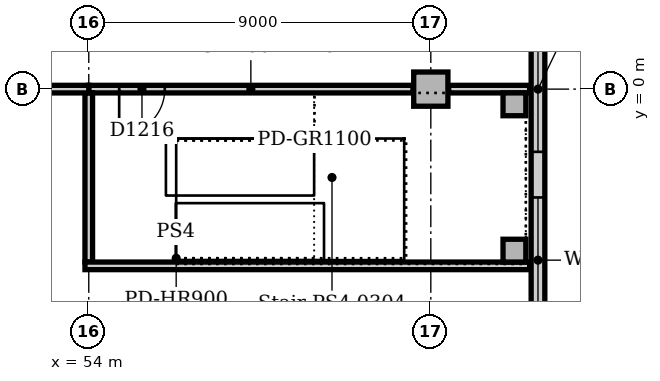
"""IFC4 building model, lengths in metres.
Left out: names, types, materials, properties, quantities, classifications, styles, units other than length and angle.
Written with IfcOpenShell. Run it as: python <this file> out.ifc"""

import sys

from ifc_helpers import new_model, si_unit, direction, frame, frame_2d, origin, origin_2d, place, context, subcontext, project, spatial, rectangle, extrude, element, fill, save


model = new_model("IFC4")
c1 = context("Model", 3, precision=1e-05, world=origin(), true_north=direction((0.0, 1.0)))
c2 = subcontext(c1, "Body", "Model", "MODEL_VIEW")
j1 = project(units=[si_unit("LENGTHUNIT", "METRE"), si_unit("PLANEANGLEUNIT", "RADIAN")], contexts=[c1])
p1 = place(None, origin())
s1 = spatial("IfcSite", under=j1, at=p1, CompositionType="ELEMENT")
p2 = place(p1, origin())
s2 = spatial("IfcBuilding", under=s1, at=p2, CompositionType="ELEMENT")
p3 = place(p2, frame((0.0, 0.0, 16.0)))
s3 = spatial("IfcBuildingStorey", under=s2, at=p3, CompositionType="ELEMENT", Elevation=16.0)
p4 = place(p3, frame((63.0, 0.0, 0.0), z_axis=(0.0, 0.0, 1.0), x_axis=(1.0, 0.0, 0.0)))
e1 = element("IfcColumn", 1, at=p4, inside=s3, PredefinedType="COLUMN", context=c2, shape_type="SweptSolid", body=[
    extrude(rectangle(XDim=0.9, YDim=0.9, at=origin_2d()), origin(), (0.0, 0.0, 1.0), 4.7),
])
p5 = place(p3, frame((65.82, -9.0, 0.0), z_axis=(0.0, 0.0, 1.0), x_axis=(0.0, 1.0, 0.0)))
e2 = element("IfcWall", 2, at=p5, inside=s3, PredefinedType="STANDARD", context=c2, shape_type="SweptSolid", body=[
    extrude(rectangle(XDim=63.0, YDim=0.36, at=frame_2d((31.5, 0.0))), origin(), (0.0, 0.0, 1.0), 4.7),
])
p6 = place(p5, frame((2.85, 0.0, 0.9)))
e3 = element("IfcOpeningElement", 3, at=p6, cuts=e2, PredefinedType="OPENING", context=c2, shape_type="SweptSolid", body=[
    extrude(rectangle(XDim=3.3, YDim=2.4, at=frame_2d((1.65, 1.2))), frame((0.0, 0.19, 0.0), z_axis=(0.0, -1.0, 0.0), x_axis=(1.0, 0.0, 0.0)), (0.0, 0.0, 1.0), 0.38),
])
p7 = place(p5, frame((7.35, 0.0, 0.9)))
e4 = element("IfcOpeningElement", 4, at=p7, cuts=e2, PredefinedType="OPENING", context=c2, shape_type="SweptSolid", body=[
    extrude(rectangle(XDim=3.3, YDim=2.4, at=frame_2d((1.65, 1.2))), frame((0.0, 0.19, 0.0), z_axis=(0.0, -1.0, 0.0), x_axis=(1.0, 0.0, 0.0)), (0.0, 0.0, 1.0), 0.38),
])
p8 = place(p5, frame((11.85, 0.0, 0.9)))
e5 = element("IfcOpeningElement", 5, at=p8, cuts=e2, PredefinedType="OPENING", context=c2, shape_type="SweptSolid", body=[
    extrude(rectangle(XDim=3.3, YDim=2.4, at=frame_2d((1.65, 1.2))), frame((0.0, 0.19, 0.0), z_axis=(0.0, -1.0, 0.0), x_axis=(1.0, 0.0, 0.0)), (0.0, 0.0, 1.0), 0.38),
])
p9 = place(p5, frame((16.35, 0.0, 0.9)))
e6 = element("IfcOpeningElement", 6, at=p9, cuts=e2, PredefinedType="OPENING", context=c2, shape_type="SweptSolid", body=[
    extrude(rectangle(XDim=3.3, YDim=2.4, at=frame_2d((1.65, 1.2))), frame((0.0, 0.19, 0.0), z_axis=(0.0, -1.0, 0.0), x_axis=(1.0, 0.0, 0.0)), (0.0, 0.0, 1.0), 0.38),
])
p10 = place(p5, frame((20.85, 0.0, 0.9)))
e7 = element("IfcOpeningElement", 7, at=p10, cuts=e2, PredefinedType="OPENING", context=c2, shape_type="SweptSolid", body=[
    extrude(rectangle(XDim=3.3, YDim=2.4, at=frame_2d((1.65, 1.2))), frame((0.0, 0.19, 0.0), z_axis=(0.0, -1.0, 0.0), x_axis=(1.0, 0.0, 0.0)), (0.0, 0.0, 1.0), 0.38),
])
p11 = place(p5, frame((25.35, 0.0, 0.9)))
e8 = element("IfcOpeningElement", 8, at=p11, cuts=e2, PredefinedType="OPENING", context=c2, shape_type="SweptSolid", body=[
    extrude(rectangle(XDim=3.3, YDim=2.4, at=frame_2d((1.65, 1.2))), frame((0.0, 0.19, 0.0), z_axis=(0.0, -1.0, 0.0), x_axis=(1.0, 0.0, 0.0)), (0.0, 0.0, 1.0), 0.38),
])
p12 = place(p5, frame((29.85, 0.0, 0.9)))
e9 = element("IfcOpeningElement", 9, at=p12, cuts=e2, PredefinedType="OPENING", context=c2, shape_type="SweptSolid", body=[
    extrude(rectangle(XDim=3.3, YDim=2.4, at=frame_2d((1.65, 1.2))), frame((0.0, 0.19, 0.0), z_axis=(0.0, -1.0, 0.0), x_axis=(1.0, 0.0, 0.0)), (0.0, 0.0, 1.0), 0.38),
])
p13 = place(p5, frame((34.35, 0.0, 0.9)))
e10 = element("IfcOpeningElement", 10, at=p13, cuts=e2, PredefinedType="OPENING", context=c2, shape_type="SweptSolid", body=[
    extrude(rectangle(XDim=3.3, YDim=2.4, at=frame_2d((1.65, 1.2))), frame((0.0, 0.19, 0.0), z_axis=(0.0, -1.0, 0.0), x_axis=(1.0, 0.0, 0.0)), (0.0, 0.0, 1.0), 0.38),
])
p14 = place(p5, frame((38.85, 0.0, 0.9)))
e11 = element("IfcOpeningElement", 11, at=p14, cuts=e2, PredefinedType="OPENING", context=c2, shape_type="SweptSolid", body=[
    extrude(rectangle(XDim=3.3, YDim=2.4, at=frame_2d((1.65, 1.2))), frame((0.0, 0.19, 0.0), z_axis=(0.0, -1.0, 0.0), x_axis=(1.0, 0.0, 0.0)), (0.0, 0.0, 1.0), 0.38),
])
p15 = place(p5, frame((43.35, 0.0, 0.9)))
e12 = element("IfcOpeningElement", 12, at=p15, cuts=e2, PredefinedType="OPENING", context=c2, shape_type="SweptSolid", body=[
    extrude(rectangle(XDim=3.3, YDim=2.4, at=frame_2d((1.65, 1.2))), frame((0.0, 0.19, 0.0), z_axis=(0.0, -1.0, 0.0), x_axis=(1.0, 0.0, 0.0)), (0.0, 0.0, 1.0), 0.38),
])
p16 = place(p5, frame((47.85, 0.0, 0.9)))
e13 = element("IfcOpeningElement", 13, at=p16, cuts=e2, PredefinedType="OPENING", context=c2, shape_type="SweptSolid", body=[
    extrude(rectangle(XDim=3.3, YDim=2.4, at=frame_2d((1.65, 1.2))), frame((0.0, 0.19, 0.0), z_axis=(0.0, -1.0, 0.0), x_axis=(1.0, 0.0, 0.0)), (0.0, 0.0, 1.0), 0.38),
])
p17 = place(p5, frame((52.35, 0.0, 0.9)))
e14 = element("IfcOpeningElement", 14, at=p17, cuts=e2, PredefinedType="OPENING", context=c2, shape_type="SweptSolid", body=[
    extrude(rectangle(XDim=3.3, YDim=2.4, at=frame_2d((1.65, 1.2))), frame((0.0, 0.19, 0.0), z_axis=(0.0, -1.0, 0.0), x_axis=(1.0, 0.0, 0.0)), (0.0, 0.0, 1.0), 0.38),
])
p18 = place(p5, frame((56.85, 0.0, 0.9)))
e15 = element("IfcOpeningElement", 15, at=p18, cuts=e2, PredefinedType="OPENING", context=c2, shape_type="SweptSolid", body=[
    extrude(rectangle(XDim=3.3, YDim=2.4, at=frame_2d((1.65, 1.2))), frame((0.0, 0.19, 0.0), z_axis=(0.0, -1.0, 0.0), x_axis=(1.0, 0.0, 0.0)), (0.0, 0.0, 1.0), 0.38),
])
for number, where, z_axis, x_axis in (
    (16, (65.2, -4.25, 0.0), (0.0, 0.0, 1.0), (1.0, 0.0, 0.0)),
    (17, (65.2, -0.4, 0.0), (0.0, 0.0, 1.0), (1.0, 0.0, 0.0)),
):
    element("IfcColumn", number, at=place(p3, frame(where, z_axis=z_axis, x_axis=x_axis)), inside=s3, PredefinedType="COLUMN", context=c2, shape_type="SweptSolid", body=[
        extrude(rectangle(XDim=0.6, YDim=0.6, at=origin_2d()), origin(), (0.0, 0.0, 1.0), 5.0),
    ])
p19 = place(p3, frame((54.0, 0.0, 0.0), z_axis=(0.0, 0.0, 1.0), x_axis=(1.0, 0.0, 0.0)))
e18 = element("IfcWall", 18, at=p19, inside=s3, PredefinedType="SOLIDWALL", context=c2, shape_type="SweptSolid", body=[
    extrude(rectangle(XDim=8.53, YDim=0.2, at=frame_2d((4.265, 0.0))), origin(), (0.0, 0.0, 1.0), 4.7),
])
p20 = place(p19, frame((0.8, 0.0, 0.0)))
e19 = element("IfcOpeningElement", 19, at=p20, cuts=e18, PredefinedType="OPENING", context=c2, shape_type="SweptSolid", body=[
    extrude(rectangle(XDim=1.2, YDim=2.1, at=frame_2d((0.6, 1.05))), frame((0.0, 0.11, 0.0), z_axis=(0.0, -1.0, 0.0), x_axis=(1.0, 0.0, 0.0)), (0.0, 0.0, 1.0), 0.22),
])
p21 = place(p3, frame((63.47, 0.0, 0.0), z_axis=(0.0, 0.0, 1.0), x_axis=(1.0, 0.0, 0.0)))
e20 = element("IfcWall", 20, at=p21, inside=s3, PredefinedType="SOLIDWALL", context=c2, shape_type="SweptSolid", body=[
    extrude(rectangle(XDim=2.13, YDim=0.2, at=frame_2d((1.065, 0.0))), origin(), (0.0, 0.0, 1.0), 4.7),
])
p22 = place(p3, frame((54.0, -4.55, 0.0), z_axis=(0.0, 0.0, 1.0), x_axis=(0.0, 1.0, 0.0)))
e21 = element("IfcWall", 21, at=p22, inside=s3, PredefinedType="SOLIDWALL", context=c2, shape_type="SweptSolid", body=[
    extrude(rectangle(XDim=4.45, YDim=0.2, at=frame_2d((2.225, 0.0))), origin(), (0.0, 0.0, 1.0), 4.7),
])
p23 = place(p3, frame((53.9, -4.65, 0.0), z_axis=(0.0, 0.0, 1.0), x_axis=(1.0, 0.0, 0.0)))
e22 = element("IfcWall", 22, at=p23, inside=s3, PredefinedType="SOLIDWALL", context=c2, shape_type="SweptSolid", body=[
    extrude(rectangle(XDim=11.7, YDim=0.2, at=frame_2d((5.85, 0.0))), origin(), (0.0, 0.0, 1.0), 4.7),
])
p24 = place(p3, frame((45.0, 0.0, 0.0), z_axis=(0.0, 0.0, 1.0), x_axis=(1.0, 0.0, 0.0)))
e23 = element("IfcWall", 23, at=p24, inside=s3, PredefinedType="PARTITIONING", context=c2, shape_type="SweptSolid", body=[
    extrude(rectangle(XDim=9.0, YDim=0.2, at=frame_2d((4.5, 0.0))), origin(), (0.0, 0.0, 1.0), 4.7),
])
p25 = place(p24, frame((4.6, 0.0, 0.0)))
e24 = element("IfcOpeningElement", 24, at=p25, cuts=e23, PredefinedType="OPENING", context=c2, shape_type="SweptSolid", body=[
    extrude(rectangle(XDim=1.0, YDim=2.1, at=frame_2d((0.5, 1.05))), frame((0.0, 0.11, 0.0), z_axis=(0.0, -1.0, 0.0), x_axis=(1.0, 0.0, 0.0)), (0.0, 0.0, 1.0), 0.22),
])
p26 = place(p6, origin())
e25 = element("IfcWindow", 25, at=p26, inside=s3, PartitioningType="SINGLE_PANEL", PredefinedType="WINDOW", context=c2, shape_type="SweptSolid", body=[
    extrude(rectangle(XDim=3.3, YDim=2.4, at=frame_2d((1.65, 1.2))), frame((0.0, 0.13, 0.0), z_axis=(0.0, -1.0, 0.0), x_axis=(1.0, 0.0, 0.0)), (0.0, 0.0, 1.0), 0.06),
])
fill(e3, e25)
p27 = place(p7, origin())
e26 = element("IfcWindow", 26, at=p27, inside=s3, PartitioningType="SINGLE_PANEL", PredefinedType="WINDOW", context=c2, shape_type="SweptSolid", body=[
    extrude(rectangle(XDim=3.3, YDim=2.4, at=frame_2d((1.65, 1.2))), frame((0.0, 0.13, 0.0), z_axis=(0.0, -1.0, 0.0), x_axis=(1.0, 0.0, 0.0)), (0.0, 0.0, 1.0), 0.06),
])
fill(e4, e26)
p28 = place(p20, frame((1.2, 0.0, 0.0), z_axis=(0.0, 0.0, 1.0), x_axis=(-1.0, 0.0, 0.0)))
e27 = element("IfcDoor", 27, at=p28, inside=s3, OperationType="SINGLE_SWING_RIGHT", PredefinedType="DOOR", context=c2, shape_type="SweptSolid", body=[
    extrude(rectangle(XDim=1.2, YDim=2.1, at=frame_2d((0.6, 1.05))), frame((0.0, 0.025, 0.0), z_axis=(0.0, -1.0, 0.0), x_axis=(1.0, 0.0, 0.0)), (0.0, 0.0, 1.0), 0.05),
])
fill(e19, e27)
save(model, sys.argv[1])
